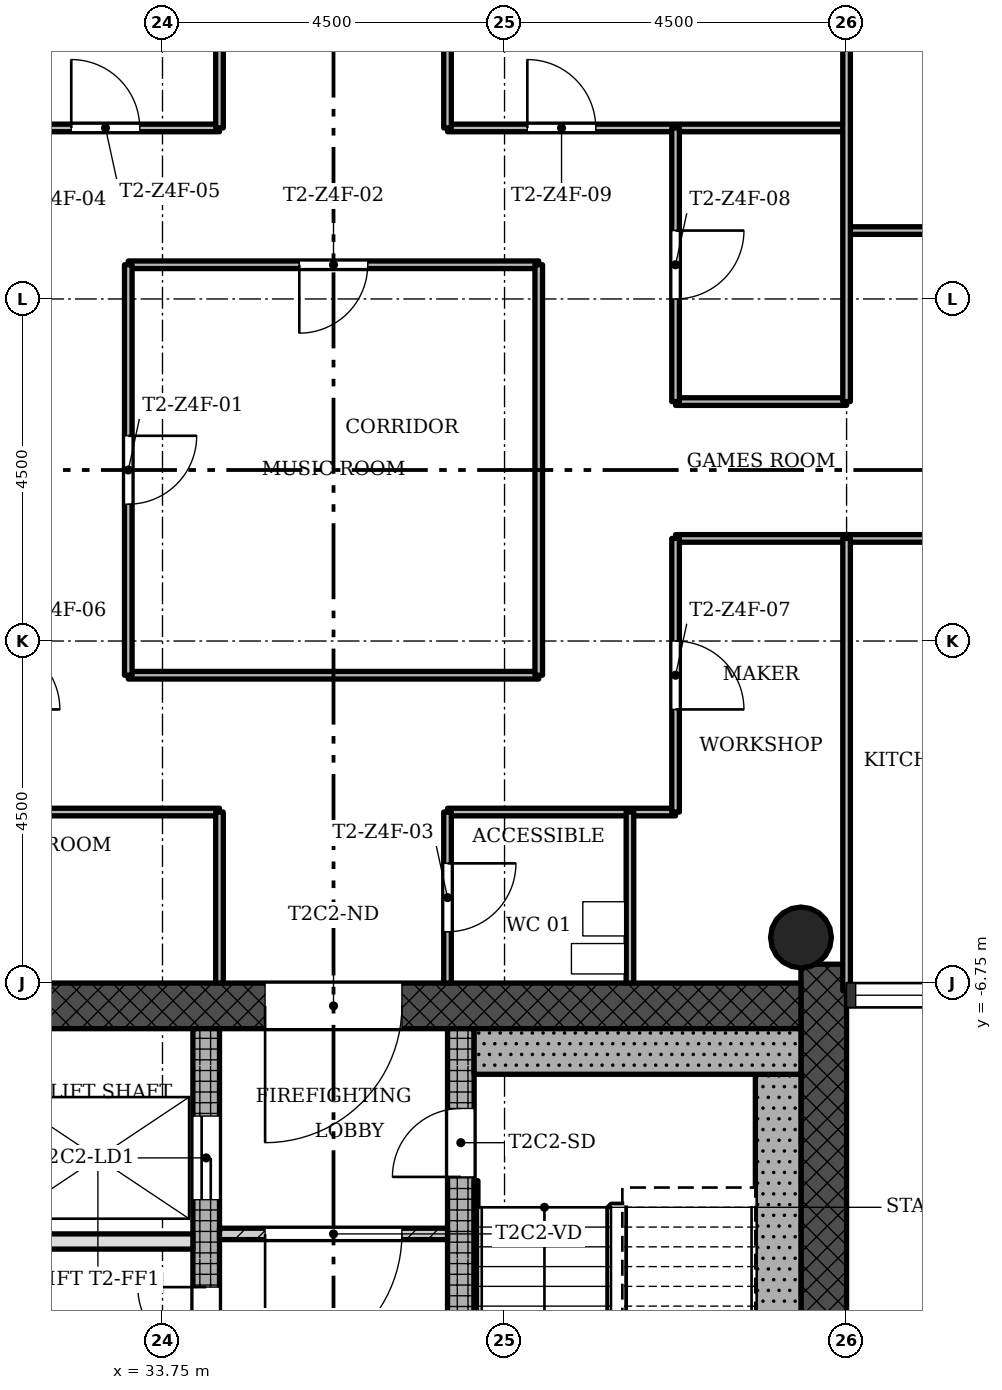
"""IFC4 building model, lengths in metres.
Left out: names, types, materials, properties, quantities, classifications, styles, units other than length and angle.
Written with IfcOpenShell. Run it as: python <this file> out.ifc"""

import sys

from ifc_helpers import new_model, si_unit, direction, frame, frame_2d, origin, origin_2d, place, context, subcontext, project, spatial, rectangle, hollow_circle, extrude, element, fill, save


model = new_model("IFC4")
c1 = context("Model", 3, precision=1e-05, world=origin(), true_north=direction((0.0, 1.0)))
c2 = subcontext(c1, "Body", "Model", "MODEL_VIEW")
j1 = project(units=[si_unit("LENGTHUNIT", "METRE"), si_unit("PLANEANGLEUNIT", "RADIAN")], contexts=[c1])
p1 = place(None, origin())
s1 = spatial("IfcSite", under=j1, at=p1, CompositionType="ELEMENT")
p2 = place(p1, origin())
s2 = spatial("IfcBuilding", under=s1, at=p2, CompositionType="ELEMENT")
p3 = place(p2, frame((0.0, 0.0, 223.2)))
s3 = spatial("IfcBuildingStorey", under=s2, at=p3, CompositionType="ELEMENT", Elevation=223.2)
p4 = place(p3, frame((42.45, -15.15, 0.0), z_axis=(0.0, 0.0, 1.0), x_axis=(0.0, 1.0, 0.0)))
e1 = element("IfcWall", 1, at=p4, inside=s3, PredefinedType="SHEAR", context=c2, shape_type="SweptSolid", body=[
    extrude(rectangle(XDim=8.648, YDim=0.6, at=frame_2d((4.324, 0.0))), origin(), (0.0, 0.0, 1.0), 3.4),
])
p5 = place(p3, frame((42.15, -7.05, 0.0), z_axis=(0.0, 0.0, 1.0), x_axis=(-1.0, 0.0, 0.0)))
e2 = element("IfcWall", 2, at=p5, inside=s3, PredefinedType="SHEAR", context=c2, shape_type="SweptSolid", body=[
    extrude(rectangle(XDim=12.9, YDim=0.6, at=frame_2d((6.45, 0.0))), origin(), (0.0, 0.0, 1.0), 3.4),
])
p6 = place(p5, frame((5.25, 0.0, 0.0)))
e3 = element("IfcOpeningElement", 3, at=p6, cuts=e2, PredefinedType="OPENING", context=c2, shape_type="SweptSolid", body=[
    extrude(rectangle(XDim=1.8, YDim=2.1, at=frame_2d((0.9, 1.05))), frame((0.0, 0.31, 0.0), z_axis=(0.0, -1.0, 0.0), x_axis=(1.0, 0.0, 0.0)), (0.0, 0.0, 1.0), 0.62),
])
p7 = place(p3, frame((34.325, -15.15, 0.0), z_axis=(0.0, 0.0, 1.0), x_axis=(0.0, 1.0, 0.0)))
e4 = element("IfcWall", 4, at=p7, inside=s3, PredefinedType="SHEAR", context=c2, shape_type="SweptSolid", body=[
    extrude(rectangle(XDim=7.8, YDim=0.35, at=frame_2d((3.9, 0.0))), origin(), (0.0, 0.0, 1.0), 3.4),
])
p8 = place(p7, frame((5.55, 0.0, 0.0)))
e5 = element("IfcOpeningElement", 5, at=p8, cuts=e4, PredefinedType="OPENING", context=c2, shape_type="SweptSolid", body=[
    extrude(rectangle(XDim=1.1, YDim=2.1, at=frame_2d((0.55, 1.05))), frame((0.0, 0.185, 0.0), z_axis=(0.0, -1.0, 0.0), x_axis=(1.0, 0.0, 0.0)), (0.0, 0.0, 1.0), 0.37),
])
p9 = place(p7, frame((1.2, 0.0, 0.0)))
e6 = element("IfcOpeningElement", 6, at=p9, cuts=e4, PredefinedType="OPENING", context=c2, shape_type="SweptSolid", body=[
    extrude(rectangle(XDim=1.1, YDim=2.1, at=frame_2d((0.55, 1.05))), frame((0.0, 0.185, 0.0), z_axis=(0.0, -1.0, 0.0), x_axis=(1.0, 0.0, 0.0)), (0.0, 0.0, 1.0), 0.37),
])
p10 = place(p7, frame((3.5, 0.0, 0.0)))
e7 = element("IfcOpeningElement", 7, at=p10, cuts=e4, PredefinedType="OPENING", context=c2, shape_type="SweptSolid", body=[
    extrude(rectangle(XDim=0.9, YDim=2.1, at=frame_2d((0.45, 1.05))), frame((0.0, 0.185, 0.0), z_axis=(0.0, -1.0, 0.0), x_axis=(1.0, 0.0, 0.0)), (0.0, 0.0, 1.0), 0.37),
])
p11 = place(p3, frame((37.675, -15.15, 0.0), z_axis=(0.0, 0.0, 1.0), x_axis=(0.0, 1.0, 0.0)))
e8 = element("IfcWall", 8, at=p11, inside=s3, PredefinedType="SHEAR", context=c2, shape_type="SweptSolid", body=[
    extrude(rectangle(XDim=7.8, YDim=0.35, at=frame_2d((3.9, 0.0))), origin(), (0.0, 0.0, 1.0), 3.4),
])
p12 = place(p11, frame((5.85, 0.0, 0.0)))
e9 = element("IfcOpeningElement", 9, at=p12, cuts=e8, PredefinedType="OPENING", context=c2, shape_type="SweptSolid", body=[
    extrude(rectangle(XDim=0.9, YDim=2.1, at=frame_2d((0.45, 1.05))), frame((0.0, 0.185, 0.0), z_axis=(0.0, -1.0, 0.0), x_axis=(1.0, 0.0, 0.0)), (0.0, 0.0, 1.0), 0.37),
])
p13 = place(p3, frame((42.15, -6.15, 0.0), z_axis=(0.0, 0.0, 1.0), x_axis=(1.0, 0.0, 0.0)))
e10 = element("IfcColumn", 10, at=p13, inside=s3, PredefinedType="COLUMN", context=c2, shape_type="SweptSolid", body=[
    extrude(hollow_circle(Radius=0.4, WallThickness=0.028, at=origin_2d()), origin(), (0.0, 0.0, 1.0), 3.4),
])
p14 = place(p3, frame((34.5, -10.05, 0.0), z_axis=(0.0, 0.0, 1.0), x_axis=(1.0, 0.0, 0.0)))
e11 = element("IfcWall", 11, at=p14, inside=s3, PredefinedType="PARTITIONING", context=c2, shape_type="SweptSolid", body=[
    extrude(rectangle(XDim=3.0, YDim=0.15, at=frame_2d((1.5, 0.0))), origin(), (0.0, 0.0, 1.0), 3.0),
])
p15 = place(p14, frame((0.6, 0.0, 0.0)))
e12 = element("IfcOpeningElement", 12, at=p15, cuts=e11, PredefinedType="OPENING", context=c2, shape_type="SweptSolid", body=[
    extrude(rectangle(XDim=1.8, YDim=2.1, at=frame_2d((0.9, 1.05))), frame((0.0, 0.085, 0.0), z_axis=(0.0, -1.0, 0.0), x_axis=(1.0, 0.0, 0.0)), (0.0, 0.0, 1.0), 0.17),
])
p16 = place(p3, frame((29.85, -10.15, 0.0), z_axis=(0.0, 0.0, 1.0), x_axis=(1.0, 0.0, 0.0)))
e13 = element("IfcWall", 13, at=p16, inside=s3, PredefinedType="SOLIDWALL", context=c2, shape_type="SweptSolid", body=[
    extrude(rectangle(XDim=4.3, YDim=0.2, at=frame_2d((2.15, 0.0))), origin(), (0.0, 0.0, 1.0), 3.0),
])
for number, where, z_axis, x_axis in (
    (14, (40.5, -4.5, 0.0), (0.0, 0.0, 1.0), (-1.0, 0.0, 0.0)),
    (15, (34.5, -4.5, 0.0), (0.0, 0.0, 1.0), (-1.0, 0.0, 0.0)),
):
    element("IfcWall", number, at=place(p3, frame(where, z_axis=z_axis, x_axis=x_axis)), inside=s3, PredefinedType="PARTITIONING", context=c2, shape_type="SweptSolid", body=[
        extrude(rectangle(XDim=3.0, YDim=0.1, at=frame_2d((1.5, 0.0))), origin(), (0.0, 0.0, 1.0), 3.0),
    ])
p17 = place(p3, frame((38.7, -2.7, 0.0), z_axis=(0.0, 0.0, 1.0), x_axis=(-1.0, 0.0, 0.0)))
e16 = element("IfcWall", 16, at=p17, inside=s3, PredefinedType="PARTITIONING", context=c2, shape_type="SweptSolid", body=[
    extrude(rectangle(XDim=5.4, YDim=0.1, at=frame_2d((2.7, 0.0))), origin(), (0.0, 0.0, 1.0), 3.0),
])
p18 = place(p3, frame((44.55, -0.9, 0.0), z_axis=(0.0, 0.0, 1.0), x_axis=(-1.0, 0.0, 0.0)))
e17 = element("IfcWall", 17, at=p18, inside=s3, PredefinedType="PARTITIONING", context=c2, shape_type="SweptSolid", body=[
    extrude(rectangle(XDim=4.05, YDim=0.1, at=frame_2d((2.025, 0.0))), origin(), (0.0, 0.0, 1.0), 3.0),
])
p19 = place(p3, frame((42.75, 0.9, 0.0), z_axis=(0.0, 0.0, 1.0), x_axis=(-1.0, 0.0, 0.0)))
e18 = element("IfcWall", 18, at=p19, inside=s3, PredefinedType="PARTITIONING", context=c2, shape_type="SweptSolid", body=[
    extrude(rectangle(XDim=2.25, YDim=0.1, at=frame_2d((1.125, 0.0))), origin(), (0.0, 0.0, 1.0), 3.0),
])
p20 = place(p3, frame((38.7, 2.7, 0.0), z_axis=(0.0, 0.0, 1.0), x_axis=(-1.0, 0.0, 0.0)))
e19 = element("IfcWall", 19, at=p20, inside=s3, PredefinedType="PARTITIONING", context=c2, shape_type="SweptSolid", body=[
    extrude(rectangle(XDim=5.4, YDim=0.1, at=frame_2d((2.7, 0.0))), origin(), (0.0, 0.0, 1.0), 3.0),
])
p21 = place(p20, frame((2.25, 0.0, 0.0)))
e20 = element("IfcOpeningElement", 20, at=p21, cuts=e19, PredefinedType="OPENING", context=c2, shape_type="SweptSolid", body=[
    extrude(rectangle(XDim=0.9, YDim=2.1, at=frame_2d((0.45, 1.05))), frame((0.0, 0.06, 0.0), z_axis=(0.0, -1.0, 0.0), x_axis=(1.0, 0.0, 0.0)), (0.0, 0.0, 1.0), 0.12),
])
p22 = place(p3, frame((47.25, 3.15, 0.0), z_axis=(0.0, 0.0, 1.0), x_axis=(-1.0, 0.0, 0.0)))
e21 = element("IfcWall", 21, at=p22, inside=s3, PredefinedType="PARTITIONING", context=c2, shape_type="SweptSolid", body=[
    extrude(rectangle(XDim=4.5, YDim=0.1, at=frame_2d((2.25, 0.0))), origin(), (0.0, 0.0, 1.0), 3.0),
])
p23 = place(p22, frame((1.8, 0.0, 0.0)))
e22 = element("IfcOpeningElement", 22, at=p23, cuts=e21, PredefinedType="OPENING", context=c2, shape_type="SweptSolid", body=[
    extrude(rectangle(XDim=0.9, YDim=2.1, at=frame_2d((0.45, 1.05))), frame((0.0, 0.06, 0.0), z_axis=(0.0, -1.0, 0.0), x_axis=(1.0, 0.0, 0.0)), (0.0, 0.0, 1.0), 0.12),
])
p24 = place(p3, frame((42.75, 4.5, 0.0), z_axis=(0.0, 0.0, 1.0), x_axis=(-1.0, 0.0, 0.0)))
e23 = element("IfcWall", 23, at=p24, inside=s3, PredefinedType="PARTITIONING", context=c2, shape_type="SweptSolid", body=[
    extrude(rectangle(XDim=5.25, YDim=0.1, at=frame_2d((2.625, 0.0))), origin(), (0.0, 0.0, 1.0), 3.0),
])
p25 = place(p24, frame((3.3, 0.0, 0.0)))
e24 = element("IfcOpeningElement", 24, at=p25, cuts=e23, PredefinedType="OPENING", context=c2, shape_type="SweptSolid", body=[
    extrude(rectangle(XDim=0.9, YDim=2.1, at=frame_2d((0.45, 1.05))), frame((0.0, 0.06, 0.0), z_axis=(0.0, -1.0, 0.0), x_axis=(1.0, 0.0, 0.0)), (0.0, 0.0, 1.0), 0.12),
])
p26 = place(p3, frame((34.5, 4.5, 0.0), z_axis=(0.0, 0.0, 1.0), x_axis=(-1.0, 0.0, 0.0)))
e25 = element("IfcWall", 25, at=p26, inside=s3, PredefinedType="PARTITIONING", context=c2, shape_type="SweptSolid", body=[
    extrude(rectangle(XDim=3.0, YDim=0.1, at=frame_2d((1.5, 0.0))), origin(), (0.0, 0.0, 1.0), 3.0),
])
p27 = place(p26, frame((1.05, 0.0, 0.0)))
e26 = element("IfcOpeningElement", 26, at=p27, cuts=e25, PredefinedType="OPENING", context=c2, shape_type="SweptSolid", body=[
    extrude(rectangle(XDim=0.9, YDim=2.1, at=frame_2d((0.45, 1.05))), frame((0.0, 0.06, 0.0), z_axis=(0.0, -1.0, 0.0), x_axis=(1.0, 0.0, 0.0)), (0.0, 0.0, 1.0), 0.12),
])
for number, where, z_axis, x_axis in (
    (27, (42.75, -6.85, 0.0), (0.0, 0.0, 1.0), (0.0, 1.0, 0.0)),
    (28, (42.75, 0.9, 0.0), (0.0, 0.0, 1.0), (0.0, 1.0, 0.0)),
):
    element("IfcWall", number, at=place(p3, frame(where, z_axis=z_axis, x_axis=x_axis)), inside=s3, PredefinedType="PARTITIONING", context=c2, shape_type="SweptSolid", body=[
        extrude(rectangle(XDim=5.95, YDim=0.1, at=frame_2d((2.975, 0.0))), origin(), (0.0, 0.0, 1.0), 3.0),
    ])
p28 = place(p3, frame((40.5, -4.5, 0.0), z_axis=(0.0, 0.0, 1.0), x_axis=(0.0, 1.0, 0.0)))
e29 = element("IfcWall", 29, at=p28, inside=s3, PredefinedType="PARTITIONING", context=c2, shape_type="SweptSolid", body=[
    extrude(rectangle(XDim=3.6, YDim=0.1, at=frame_2d((1.8, 0.0))), origin(), (0.0, 0.0, 1.0), 3.0),
])
p29 = place(p28, frame((1.35, 0.0, 0.0)))
e30 = element("IfcOpeningElement", 30, at=p29, cuts=e29, PredefinedType="OPENING", context=c2, shape_type="SweptSolid", body=[
    extrude(rectangle(XDim=0.9, YDim=2.1, at=frame_2d((0.45, 1.05))), frame((0.0, 0.06, 0.0), z_axis=(0.0, -1.0, 0.0), x_axis=(1.0, 0.0, 0.0)), (0.0, 0.0, 1.0), 0.12),
])
p30 = place(p3, frame((40.5, 0.9, 0.0), z_axis=(0.0, 0.0, 1.0), x_axis=(0.0, 1.0, 0.0)))
e31 = element("IfcWall", 31, at=p30, inside=s3, PredefinedType="PARTITIONING", context=c2, shape_type="SweptSolid", body=[
    extrude(rectangle(XDim=3.6, YDim=0.1, at=frame_2d((1.8, 0.0))), origin(), (0.0, 0.0, 1.0), 3.0),
])
p31 = place(p30, frame((1.35, 0.0, 0.0)))
e32 = element("IfcOpeningElement", 32, at=p31, cuts=e31, PredefinedType="OPENING", context=c2, shape_type="SweptSolid", body=[
    extrude(rectangle(XDim=0.9, YDim=2.1, at=frame_2d((0.45, 1.05))), frame((0.0, 0.06, 0.0), z_axis=(0.0, -1.0, 0.0), x_axis=(1.0, 0.0, 0.0)), (0.0, 0.0, 1.0), 0.12),
])
p32 = place(p3, frame((39.9, -6.75, 0.0), z_axis=(0.0, 0.0, 1.0), x_axis=(0.0, 1.0, 0.0)))
e33 = element("IfcWall", 33, at=p32, inside=s3, PredefinedType="PARTITIONING", context=c2, shape_type="SweptSolid", body=[
    extrude(rectangle(XDim=2.25, YDim=0.1, at=frame_2d((1.125, 0.0))), origin(), (0.0, 0.0, 1.0), 3.0),
])
p33 = place(p3, frame((38.7, -2.7, 0.0), z_axis=(0.0, 0.0, 1.0), x_axis=(0.0, 1.0, 0.0)))
e34 = element("IfcWall", 34, at=p33, inside=s3, PredefinedType="PARTITIONING", context=c2, shape_type="SweptSolid", body=[
    extrude(rectangle(XDim=5.4, YDim=0.1, at=frame_2d((2.7, 0.0))), origin(), (0.0, 0.0, 1.0), 3.0),
])
p34 = place(p3, frame((37.5, -6.75, 0.0), z_axis=(0.0, 0.0, 1.0), x_axis=(0.0, 1.0, 0.0)))
e35 = element("IfcWall", 35, at=p34, inside=s3, PredefinedType="PARTITIONING", context=c2, shape_type="SweptSolid", body=[
    extrude(rectangle(XDim=2.25, YDim=0.1, at=frame_2d((1.125, 0.0))), origin(), (0.0, 0.0, 1.0), 3.0),
])
p35 = place(p34, frame((0.675, 0.0, 0.0)))
e36 = element("IfcOpeningElement", 36, at=p35, cuts=e35, PredefinedType="OPENING", context=c2, shape_type="SweptSolid", body=[
    extrude(rectangle(XDim=0.9, YDim=2.1, at=frame_2d((0.45, 1.05))), frame((0.0, 0.06, 0.0), z_axis=(0.0, -1.0, 0.0), x_axis=(1.0, 0.0, 0.0)), (0.0, 0.0, 1.0), 0.12),
])
for number, where, z_axis, x_axis in (
    (37, (37.5, 4.5, 0.0), (0.0, 0.0, 1.0), (0.0, 1.0, 0.0)),
    (38, (34.5, -6.75, 0.0), (0.0, 0.0, 1.0), (0.0, 1.0, 0.0)),
    (39, (34.5, 4.5, 0.0), (0.0, 0.0, 1.0), (0.0, 1.0, 0.0)),
):
    element("IfcWall", number, at=place(p3, frame(where, z_axis=z_axis, x_axis=x_axis)), inside=s3, PredefinedType="PARTITIONING", context=c2, shape_type="SweptSolid", body=[
        extrude(rectangle(XDim=2.25, YDim=0.1, at=frame_2d((1.125, 0.0))), origin(), (0.0, 0.0, 1.0), 3.0),
    ])
p36 = place(p3, frame((33.3, -2.7, 0.0), z_axis=(0.0, 0.0, 1.0), x_axis=(0.0, 1.0, 0.0)))
e40 = element("IfcWall", 40, at=p36, inside=s3, PredefinedType="PARTITIONING", context=c2, shape_type="SweptSolid", body=[
    extrude(rectangle(XDim=5.4, YDim=0.1, at=frame_2d((2.7, 0.0))), origin(), (0.0, 0.0, 1.0), 3.0),
])
p37 = place(p36, frame((2.25, 0.0, 0.0)))
e41 = element("IfcOpeningElement", 41, at=p37, cuts=e40, PredefinedType="OPENING", context=c2, shape_type="SweptSolid", body=[
    extrude(rectangle(XDim=0.9, YDim=2.1, at=frame_2d((0.45, 1.05))), frame((0.0, 0.06, 0.0), z_axis=(0.0, -1.0, 0.0), x_axis=(1.0, 0.0, 0.0)), (0.0, 0.0, 1.0), 0.12),
])
p38 = place(p3, frame((41.85, -7.95, 0.0), z_axis=(0.0, 0.0, 1.0), x_axis=(0.0, -1.0, 0.0)))
e42 = element("IfcWall", 42, at=p38, inside=s3, PredefinedType="SHEAR", context=c2, shape_type="SweptSolid", body=[
    extrude(rectangle(XDim=6.6, YDim=0.6, at=frame_2d((3.3, 0.0))), origin(), (0.0, 0.0, 1.0), 3.4),
])
p39 = place(p3, frame((37.85, -7.65, 0.0), z_axis=(0.0, 0.0, 1.0), x_axis=(1.0, 0.0, 0.0)))
e43 = element("IfcWall", 43, at=p39, inside=s3, PredefinedType="SHEAR", context=c2, shape_type="SweptSolid", body=[
    extrude(rectangle(XDim=4.3, YDim=0.6, at=frame_2d((2.15, 0.0))), origin(), (0.0, 0.0, 1.0), 3.4),
])
p40 = place(p3, frame((37.875, -9.35, 0.0), z_axis=(0.0, 0.0, 1.0), x_axis=(0.0, -1.0, 0.0)))
e44 = element("IfcWall", 44, at=p40, inside=s3, PredefinedType="SHEAR", context=c2, shape_type="SweptSolid", body=[
    extrude(rectangle(XDim=5.2, YDim=0.05, at=frame_2d((2.6, 0.0))), origin(), (0.0, 0.0, 1.0), 3.4),
])
p41 = place(p15, origin())
e45 = element("IfcDoor", 45, at=p41, inside=s3, OperationType="SINGLE_SWING_LEFT", PredefinedType="DOOR", context=c2, shape_type="SweptSolid", body=[
    extrude(rectangle(XDim=1.8, YDim=2.1, at=frame_2d((0.9, 1.05))), frame((0.0, 0.025, 0.0), z_axis=(0.0, -1.0, 0.0), x_axis=(1.0, 0.0, 0.0)), (0.0, 0.0, 1.0), 0.05),
])
fill(e12, e45)
p42 = place(p37, origin())
e46 = element("IfcDoor", 46, at=p42, inside=s3, OperationType="SINGLE_SWING_RIGHT", PredefinedType="DOOR", context=c2, shape_type="SweptSolid", body=[
    extrude(rectangle(XDim=0.9, YDim=2.1, at=frame_2d((0.45, 1.05))), frame((0.0, 0.025, 0.0), z_axis=(0.0, -1.0, 0.0), x_axis=(1.0, 0.0, 0.0)), (0.0, 0.0, 1.0), 0.05),
])
fill(e41, e46)
p43 = place(p21, origin())
e47 = element("IfcDoor", 47, at=p43, inside=s3, OperationType="SINGLE_SWING_LEFT", PredefinedType="DOOR", context=c2, shape_type="SweptSolid", body=[
    extrude(rectangle(XDim=0.9, YDim=2.1, at=frame_2d((0.45, 1.05))), frame((0.0, 0.025, 0.0), z_axis=(0.0, -1.0, 0.0), x_axis=(1.0, 0.0, 0.0)), (0.0, 0.0, 1.0), 0.05),
])
fill(e20, e47)
p44 = place(p35, origin())
e48 = element("IfcDoor", 48, at=p44, inside=s3, OperationType="SINGLE_SWING_RIGHT", PredefinedType="DOOR", context=c2, shape_type="SweptSolid", body=[
    extrude(rectangle(XDim=0.9, YDim=2.1, at=frame_2d((0.45, 1.05))), frame((0.0, 0.025, 0.0), z_axis=(0.0, -1.0, 0.0), x_axis=(1.0, 0.0, 0.0)), (0.0, 0.0, 1.0), 0.05),
])
fill(e36, e48)
p45 = place(p27, origin())
e49 = element("IfcDoor", 49, at=p45, inside=s3, OperationType="SINGLE_SWING_RIGHT", PredefinedType="DOOR", context=c2, shape_type="SweptSolid", body=[
    extrude(rectangle(XDim=0.9, YDim=2.1, at=frame_2d((0.45, 1.05))), frame((0.0, 0.025, 0.0), z_axis=(0.0, -1.0, 0.0), x_axis=(1.0, 0.0, 0.0)), (0.0, 0.0, 1.0), 0.05),
])
fill(e26, e49)
p46 = place(p29, origin())
e50 = element("IfcDoor", 50, at=p46, inside=s3, OperationType="SINGLE_SWING_LEFT", PredefinedType="DOOR", context=c2, shape_type="SweptSolid", body=[
    extrude(rectangle(XDim=0.9, YDim=2.1, at=frame_2d((0.45, 1.05))), frame((0.0, 0.025, 0.0), z_axis=(0.0, -1.0, 0.0), x_axis=(1.0, 0.0, 0.0)), (0.0, 0.0, 1.0), 0.05),
])
fill(e30, e50)
p47 = place(p31, origin())
e51 = element("IfcDoor", 51, at=p47, inside=s3, OperationType="SINGLE_SWING_RIGHT", PredefinedType="DOOR", context=c2, shape_type="SweptSolid", body=[
    extrude(rectangle(XDim=0.9, YDim=2.1, at=frame_2d((0.45, 1.05))), frame((0.0, 0.025, 0.0), z_axis=(0.0, -1.0, 0.0), x_axis=(1.0, 0.0, 0.0)), (0.0, 0.0, 1.0), 0.05),
])
fill(e32, e51)
p48 = place(p25, origin())
e52 = element("IfcDoor", 52, at=p48, inside=s3, OperationType="SINGLE_SWING_RIGHT", PredefinedType="DOOR", context=c2, shape_type="SweptSolid", body=[
    extrude(rectangle(XDim=0.9, YDim=2.1, at=frame_2d((0.45, 1.05))), frame((0.0, 0.025, 0.0), z_axis=(0.0, -1.0, 0.0), x_axis=(1.0, 0.0, 0.0)), (0.0, 0.0, 1.0), 0.05),
])
fill(e24, e52)
p49 = place(p12, origin())
e53 = element("IfcDoor", 53, at=p49, inside=s3, OperationType="SINGLE_SWING_RIGHT", PredefinedType="DOOR", context=c2, shape_type="SweptSolid", body=[
    extrude(rectangle(XDim=0.9, YDim=2.1, at=frame_2d((0.45, 1.05))), frame((0.0, 0.025, 0.0), z_axis=(0.0, -1.0, 0.0), x_axis=(1.0, 0.0, 0.0)), (0.0, 0.0, 1.0), 0.05),
])
fill(e9, e53)
p50 = place(p8, origin())
e54 = element("IfcDoor", 54, at=p50, inside=s3, OperationType="SLIDING_TO_LEFT", PredefinedType="DOOR", context=c2, shape_type="SweptSolid", body=[
    extrude(rectangle(XDim=1.1, YDim=2.1, at=frame_2d((0.55, 1.05))), frame((0.0, 0.025, 0.0), z_axis=(0.0, -1.0, 0.0), x_axis=(1.0, 0.0, 0.0)), (0.0, 0.0, 1.0), 0.05),
])
fill(e5, e54)
p51 = place(p10, origin())
e55 = element("IfcDoor", 55, at=p51, inside=s3, OperationType="SINGLE_SWING_LEFT", PredefinedType="DOOR", context=c2, shape_type="SweptSolid", body=[
    extrude(rectangle(XDim=0.9, YDim=2.1, at=frame_2d((0.45, 1.05))), frame((0.0, 0.025, 0.0), z_axis=(0.0, -1.0, 0.0), x_axis=(1.0, 0.0, 0.0)), (0.0, 0.0, 1.0), 0.05),
])
fill(e7, e55)
p52 = place(p6, origin())
e56 = element("IfcDoor", 56, at=p52, inside=s3, OperationType="SINGLE_SWING_LEFT", PredefinedType="DOOR", context=c2, shape_type="SweptSolid", body=[
    extrude(rectangle(XDim=1.8, YDim=2.1, at=frame_2d((0.9, 1.05))), frame((0.0, 0.025, 0.0), z_axis=(0.0, -1.0, 0.0), x_axis=(1.0, 0.0, 0.0)), (0.0, 0.0, 1.0), 0.05),
])
fill(e3, e56)
save(model, sys.argv[1])
